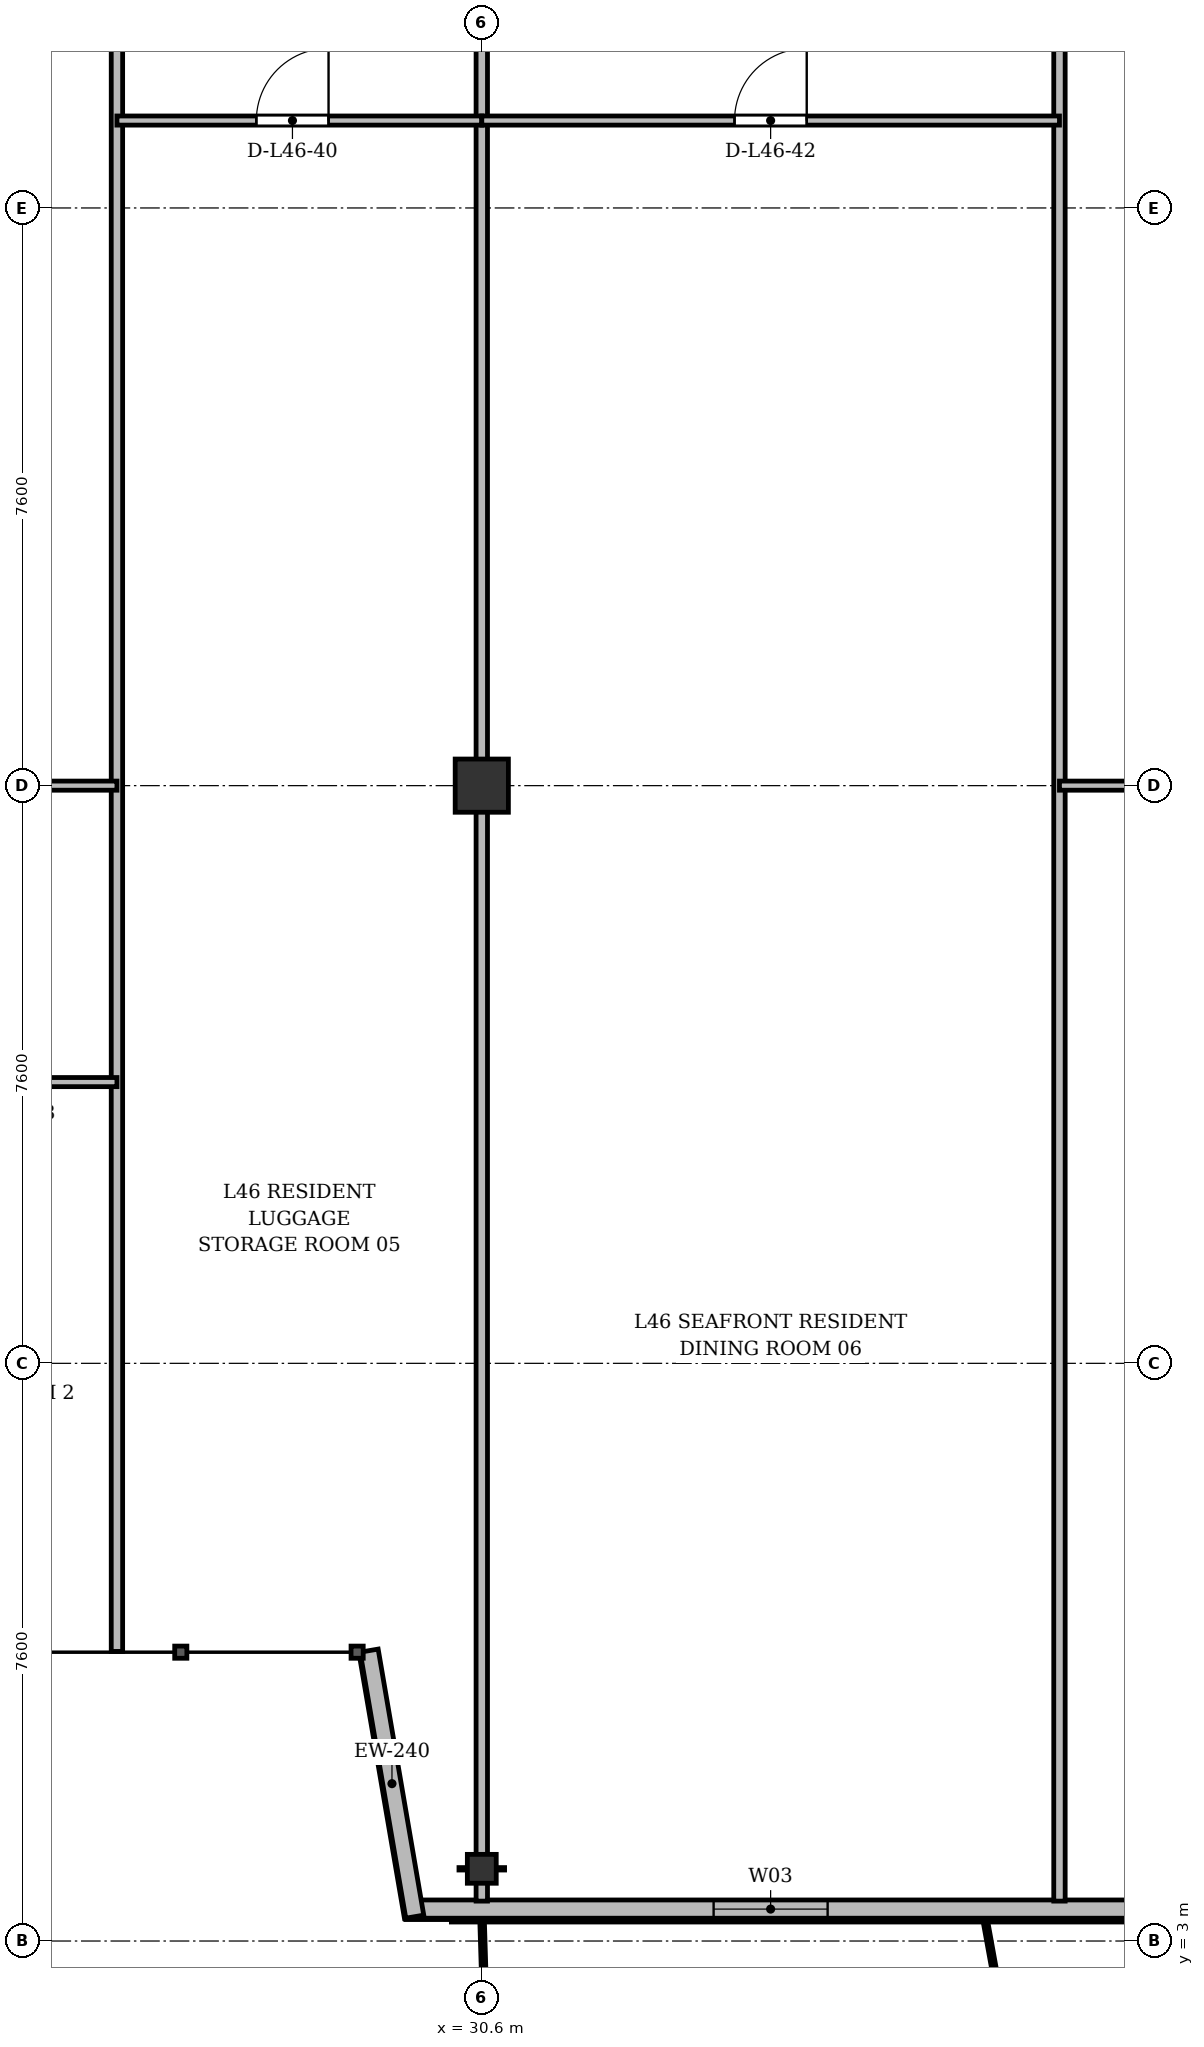
"""IFC4 building model, lengths in metres.
Left out: names, types, materials, properties, quantities, classifications, styles, units other than length and angle.
Written with IfcOpenShell. Run it as: python <this file> out.ifc"""

import sys

from ifc_helpers import new_model, si_unit, direction, frame, frame_2d, origin, origin_2d, place, context, subcontext, project, spatial, rectangle, i_section, extrude, source, transform, mapped, element, fill, save


model = new_model("IFC4")
c1 = context("Model", 3, precision=1e-05, world=origin(), true_north=direction((0.0, 1.0)))
c2 = subcontext(c1, "Body", "Model", "MODEL_VIEW")
j1 = project(units=[si_unit("LENGTHUNIT", "METRE"), si_unit("PLANEANGLEUNIT", "RADIAN")], contexts=[c1])
p1 = place(None, origin())
s1 = spatial("IfcSite", under=j1, at=p1, CompositionType="ELEMENT")
p2 = place(p1, origin())
s2 = spatial("IfcBuilding", under=s1, at=p2, CompositionType="ELEMENT")
p3 = place(p2, frame((0.0, 0.0, 175.3)))
s3 = spatial("IfcBuildingStorey", under=s2, at=p3, CompositionType="ELEMENT", Elevation=175.3)
m1 = source(origin(), c2, "Body", "SweptSolid", [
    extrude(i_section(OverallWidth=0.38, OverallDepth=0.38, WebThickness=0.02, FlangeThickness=0.03, at=origin_2d()), origin(), (0.0, 0.0, 1.0), 3.6),
])
p4 = place(p3, frame((30.6, 3.95, 0.0), z_axis=(0.0, 0.0, 1.0), x_axis=(1.0, 0.0, 0.0)))
e1 = element("IfcColumn", 1, at=p4, inside=s3, PredefinedType="COLUMN", context=c2, shape_type="MappedRepresentation", body=[
    mapped(m1, transform((0.0, 0.0, 0.0), x_axis=(1.0, 0.0, 0.0), y_axis=(0.0, 1.0, 0.0), z_axis=(0.0, 0.0, 1.0), scale=1.0)),
])
m2 = source(origin(), c2, "Body", "SweptSolid", [
    extrude(rectangle(XDim=0.7, YDim=0.7, at=origin_2d()), origin(), (0.0, 0.0, 1.0), 3.6),
])
p5 = place(p3, frame((30.6, 18.2, 0.0), z_axis=(0.0, 0.0, 1.0), x_axis=(1.0, 0.0, 0.0)))
e2 = element("IfcColumn", 2, at=p5, inside=s3, PredefinedType="COLUMN", context=c2, shape_type="MappedRepresentation", body=[
    mapped(m2, transform((0.0, 0.0, 0.0), x_axis=(1.0, 0.0, 0.0), y_axis=(0.0, 1.0, 0.0), z_axis=(0.0, 0.0, 1.0), scale=1.0)),
])
p6 = place(p3, frame((63.6, 3.42, 0.0), z_axis=(0.0, 0.0, 1.0), x_axis=(-1.0, 0.0, 0.0)))
e3 = element("IfcWall", 3, at=p6, inside=s3, PredefinedType="SOLIDWALL", context=c2, shape_type="SweptSolid", body=[
    extrude(rectangle(XDim=34.0, YDim=0.24, at=frame_2d((17.0, 0.0))), origin(), (0.0, 0.0, 1.0), 3.35),
])
p7 = place(p6, frame((2.645, 0.0, 0.9)))
e4 = element("IfcOpeningElement", 4, at=p7, cuts=e3, PredefinedType="OPENING", context=c2, shape_type="SweptSolid", body=[
    extrude(rectangle(XDim=2.2, YDim=1.8, at=frame_2d((1.1, 0.9))), frame((0.0, 0.13, 0.0), z_axis=(0.0, -1.0, 0.0), x_axis=(1.0, 0.0, 0.0)), (0.0, 0.0, 1.0), 0.26),
])
p8 = place(p6, frame((7.69, 0.0, 0.0)))
e5 = element("IfcOpeningElement", 5, at=p8, cuts=e3, PredefinedType="OPENING", context=c2, shape_type="SweptSolid", body=[
    extrude(rectangle(XDim=1.2, YDim=2.2, at=frame_2d((0.6, 1.1))), frame((0.0, 0.13, 0.0), z_axis=(0.0, -1.0, 0.0), x_axis=(1.0, 0.0, 0.0)), (0.0, 0.0, 1.0), 0.26),
])
p9 = place(p6, frame((10.0, 0.0, 0.9)))
e6 = element("IfcOpeningElement", 6, at=p9, cuts=e3, PredefinedType="OPENING", context=c2, shape_type="SweptSolid", body=[
    extrude(rectangle(XDim=2.0, YDim=1.95, at=frame_2d((1.0, 0.975))), frame((0.0, 0.13, 0.0), z_axis=(0.0, -1.0, 0.0), x_axis=(1.0, 0.0, 0.0)), (0.0, 0.0, 1.0), 0.26),
])
p10 = place(p6, frame((13.575, 0.0, 0.9)))
e7 = element("IfcOpeningElement", 7, at=p10, cuts=e3, PredefinedType="OPENING", context=c2, shape_type="SweptSolid", body=[
    extrude(rectangle(XDim=1.65, YDim=1.85, at=frame_2d((0.825, 0.925))), frame((0.0, 0.13, 0.0), z_axis=(0.0, -1.0, 0.0), x_axis=(1.0, 0.0, 0.0)), (0.0, 0.0, 1.0), 0.26),
])
p11 = place(p6, frame((17.1, 0.0, 0.9)))
e8 = element("IfcOpeningElement", 8, at=p11, cuts=e3, PredefinedType="OPENING", context=c2, shape_type="SweptSolid", body=[
    extrude(rectangle(XDim=1.8, YDim=1.8, at=frame_2d((0.9, 0.9))), frame((0.0, 0.13, 0.0), z_axis=(0.0, -1.0, 0.0), x_axis=(1.0, 0.0, 0.0)), (0.0, 0.0, 1.0), 0.26),
])
p12 = place(p6, frame((21.5, 0.0, 0.9)))
e9 = element("IfcOpeningElement", 9, at=p12, cuts=e3, PredefinedType="OPENING", context=c2, shape_type="SweptSolid", body=[
    extrude(rectangle(XDim=2.2, YDim=1.8, at=frame_2d((1.1, 0.9))), frame((0.0, 0.13, 0.0), z_axis=(0.0, -1.0, 0.0), x_axis=(1.0, 0.0, 0.0)), (0.0, 0.0, 1.0), 0.26),
])
p13 = place(p6, frame((28.45, 0.0, 0.9)))
e10 = element("IfcOpeningElement", 10, at=p13, cuts=e3, PredefinedType="OPENING", context=c2, shape_type="SweptSolid", body=[
    extrude(rectangle(XDim=1.5, YDim=1.75, at=frame_2d((0.75, 0.875))), frame((0.0, 0.13, 0.0), z_axis=(0.0, -1.0, 0.0), x_axis=(1.0, 0.0, 0.0)), (0.0, 0.0, 1.0), 0.26),
])
p14 = place(p3, frame((29.718, 3.32, 0.0), z_axis=(0.0, 0.0, 1.0), x_axis=(-0.168923741424, 0.98562912375, 0.0)))
e11 = element("IfcWall", 11, at=p14, inside=s3, PredefinedType="SOLIDWALL", context=c2, shape_type="SweptSolid", body=[
    extrude(rectangle(XDim=3.551, YDim=0.24, at=frame_2d((1.775, 0.0))), origin(), (0.0, 0.0, 1.0), 2.75),
])
p15 = place(p3, frame((25.8, 6.81, 0.0), z_axis=(0.0, 0.0, 1.0), x_axis=(0.0, 1.0, 0.0)))
e12 = element("IfcWall", 12, at=p15, inside=s3, PredefinedType="PARTITIONING", context=c2, shape_type="SweptSolid", body=[
    extrude(rectangle(XDim=23.99, YDim=0.15, at=frame_2d((11.995, 0.0))), origin(), (0.0, 0.0, 1.0), 2.75),
])
p16 = place(p3, frame((30.6, 3.525, 0.0), z_axis=(0.0, 0.0, 1.0), x_axis=(0.0, 1.0, 0.0)))
e13 = element("IfcWall", 13, at=p16, inside=s3, PredefinedType="PARTITIONING", context=c2, shape_type="SweptSolid", body=[
    extrude(rectangle(XDim=27.275, YDim=0.15, at=frame_2d((13.638, 0.0))), origin(), (0.0, 0.0, 1.0), 2.85),
])
p17 = place(p3, frame((38.2, 3.525, 0.0), z_axis=(0.0, 0.0, 1.0), x_axis=(0.0, 1.0, 0.0)))
e14 = element("IfcWall", 14, at=p17, inside=s3, PredefinedType="PARTITIONING", context=c2, shape_type="SweptSolid", body=[
    extrude(rectangle(XDim=27.275, YDim=0.15, at=frame_2d((13.638, 0.0))), origin(), (0.0, 0.0, 1.0), 2.75),
])
p18 = place(p3, frame((20.2, 18.2, 0.0), z_axis=(0.0, 0.0, 1.0), x_axis=(1.0, 0.0, 0.0)))
e15 = element("IfcWall", 15, at=p18, inside=s3, PredefinedType="PARTITIONING", context=c2, shape_type="SweptSolid", body=[
    extrude(rectangle(XDim=5.6, YDim=0.12, at=frame_2d((2.8, 0.0))), origin(), (0.0, 0.0, 1.0), 2.75),
])
p19 = place(p18, frame((1.306, 0.0, 0.0)))
e16 = element("IfcOpeningElement", 16, at=p19, cuts=e15, PredefinedType="OPENING", context=c2, shape_type="SweptSolid", body=[
    extrude(rectangle(XDim=0.95, YDim=2.15, at=frame_2d((0.475, 1.075))), frame((0.0, 0.07, 0.0), z_axis=(0.0, -1.0, 0.0), x_axis=(1.0, 0.0, 0.0)), (0.0, 0.0, 1.0), 0.14),
])
p20 = place(p3, frame((23.0, 14.3, 0.0), z_axis=(0.0, 0.0, 1.0), x_axis=(1.0, 0.0, 0.0)))
e17 = element("IfcWall", 17, at=p20, inside=s3, PredefinedType="PARTITIONING", context=c2, shape_type="SweptSolid", body=[
    extrude(rectangle(XDim=2.8, YDim=0.12, at=frame_2d((1.4, 0.0))), origin(), (0.0, 0.0, 1.0), 2.85),
])
p21 = place(p20, frame((0.925, 0.0, 0.0)))
e18 = element("IfcOpeningElement", 18, at=p21, cuts=e17, PredefinedType="OPENING", context=c2, shape_type="SweptSolid", body=[
    extrude(rectangle(XDim=0.95, YDim=2.15, at=frame_2d((0.475, 1.075))), frame((0.0, 0.07, 0.0), z_axis=(0.0, -1.0, 0.0), x_axis=(1.0, 0.0, 0.0)), (0.0, 0.0, 1.0), 0.14),
])
p22 = place(p3, frame((25.8, 26.95, 0.0), z_axis=(0.0, 0.0, 1.0), x_axis=(1.0, 0.0, 0.0)))
e19 = element("IfcWall", 19, at=p22, inside=s3, PredefinedType="PARTITIONING", context=c2, shape_type="SweptSolid", body=[
    extrude(rectangle(XDim=4.8, YDim=0.12, at=frame_2d((2.4, 0.0))), origin(), (0.0, 0.0, 1.0), 2.85),
])
p23 = place(p22, frame((1.834, 0.0, 0.0)))
e20 = element("IfcOpeningElement", 20, at=p23, cuts=e19, PredefinedType="OPENING", context=c2, shape_type="SweptSolid", body=[
    extrude(rectangle(XDim=0.95, YDim=2.15, at=frame_2d((0.475, 1.075))), frame((0.0, 0.07, 0.0), z_axis=(0.0, -1.0, 0.0), x_axis=(1.0, 0.0, 0.0)), (0.0, 0.0, 1.0), 0.14),
])
p24 = place(p3, frame((30.6, 26.95, 0.0), z_axis=(0.0, 0.0, 1.0), x_axis=(1.0, 0.0, 0.0)))
e21 = element("IfcWall", 21, at=p24, inside=s3, PredefinedType="PARTITIONING", context=c2, shape_type="SweptSolid", body=[
    extrude(rectangle(XDim=7.6, YDim=0.12, at=frame_2d((3.8, 0.0))), origin(), (0.0, 0.0, 1.0), 2.85),
])
p25 = place(p24, frame((3.325, 0.0, 0.0)))
e22 = element("IfcOpeningElement", 22, at=p25, cuts=e21, PredefinedType="OPENING", context=c2, shape_type="SweptSolid", body=[
    extrude(rectangle(XDim=0.95, YDim=2.15, at=frame_2d((0.475, 1.075))), frame((0.0, 0.07, 0.0), z_axis=(0.0, -1.0, 0.0), x_axis=(1.0, 0.0, 0.0)), (0.0, 0.0, 1.0), 0.14),
])
p26 = place(p3, frame((38.2, 18.2, 0.0), z_axis=(0.0, 0.0, 1.0), x_axis=(1.0, 0.0, 0.0)))
e23 = element("IfcWall", 23, at=p26, inside=s3, PredefinedType="PARTITIONING", context=c2, shape_type="SweptSolid", body=[
    extrude(rectangle(XDim=5.6, YDim=0.12, at=frame_2d((2.8, 0.0))), origin(), (0.0, 0.0, 1.0), 2.75),
])
p27 = place(p26, frame((2.232, 0.0, 0.0)))
e24 = element("IfcOpeningElement", 24, at=p27, cuts=e23, PredefinedType="OPENING", context=c2, shape_type="SweptSolid", body=[
    extrude(rectangle(XDim=0.95, YDim=2.15, at=frame_2d((0.475, 1.075))), frame((0.0, 0.07, 0.0), z_axis=(0.0, -1.0, 0.0), x_axis=(1.0, 0.0, 0.0)), (0.0, 0.0, 1.0), 0.14),
])
m3 = source(origin(), c2, "Body", "SweptSolid", [
    extrude(rectangle(XDim=1.5, YDim=1.75, at=frame_2d((0.75, 0.875))), frame((0.0, 0.03, 0.0), z_axis=(0.0, -1.0, 0.0), x_axis=(1.0, 0.0, 0.0)), (0.0, 0.0, 1.0), 0.06),
])
p28 = place(p13, origin())
e25 = element("IfcWindow", 25, at=p28, inside=s3, PartitioningType="SINGLE_PANEL", PredefinedType="WINDOW", context=c2, shape_type="MappedRepresentation", body=[
    mapped(m3, transform((0.0, 0.0, 0.0), x_axis=(1.0, 0.0, 0.0), y_axis=(0.0, 1.0, 0.0), z_axis=(0.0, 0.0, 1.0), scale=1.0)),
])
fill(e10, e25)
m4 = source(origin(), c2, "Body", "SweptSolid", [
    extrude(rectangle(XDim=0.95, YDim=2.15, at=frame_2d((0.475, 1.075))), frame((0.0, 0.025, 0.0), z_axis=(0.0, -1.0, 0.0), x_axis=(1.0, 0.0, 0.0)), (0.0, 0.0, 1.0), 0.05),
])
p29 = place(p23, origin())
e26 = element("IfcDoor", 26, at=p29, inside=s3, OperationType="SINGLE_SWING_RIGHT", PredefinedType="DOOR", context=c2, shape_type="MappedRepresentation", body=[
    mapped(m4, transform((0.0, 0.0, 0.0), x_axis=(1.0, 0.0, 0.0), y_axis=(0.0, 1.0, 0.0), z_axis=(0.0, 0.0, 1.0), scale=1.0)),
])
fill(e20, e26)
p30 = place(p25, origin())
e27 = element("IfcDoor", 27, at=p30, inside=s3, OperationType="SINGLE_SWING_RIGHT", PredefinedType="DOOR", context=c2, shape_type="MappedRepresentation", body=[
    mapped(m4, transform((0.0, 0.0, 0.0), x_axis=(1.0, 0.0, 0.0), y_axis=(0.0, 1.0, 0.0), z_axis=(0.0, 0.0, 1.0), scale=1.0)),
])
fill(e22, e27)
save(model, sys.argv[1])
